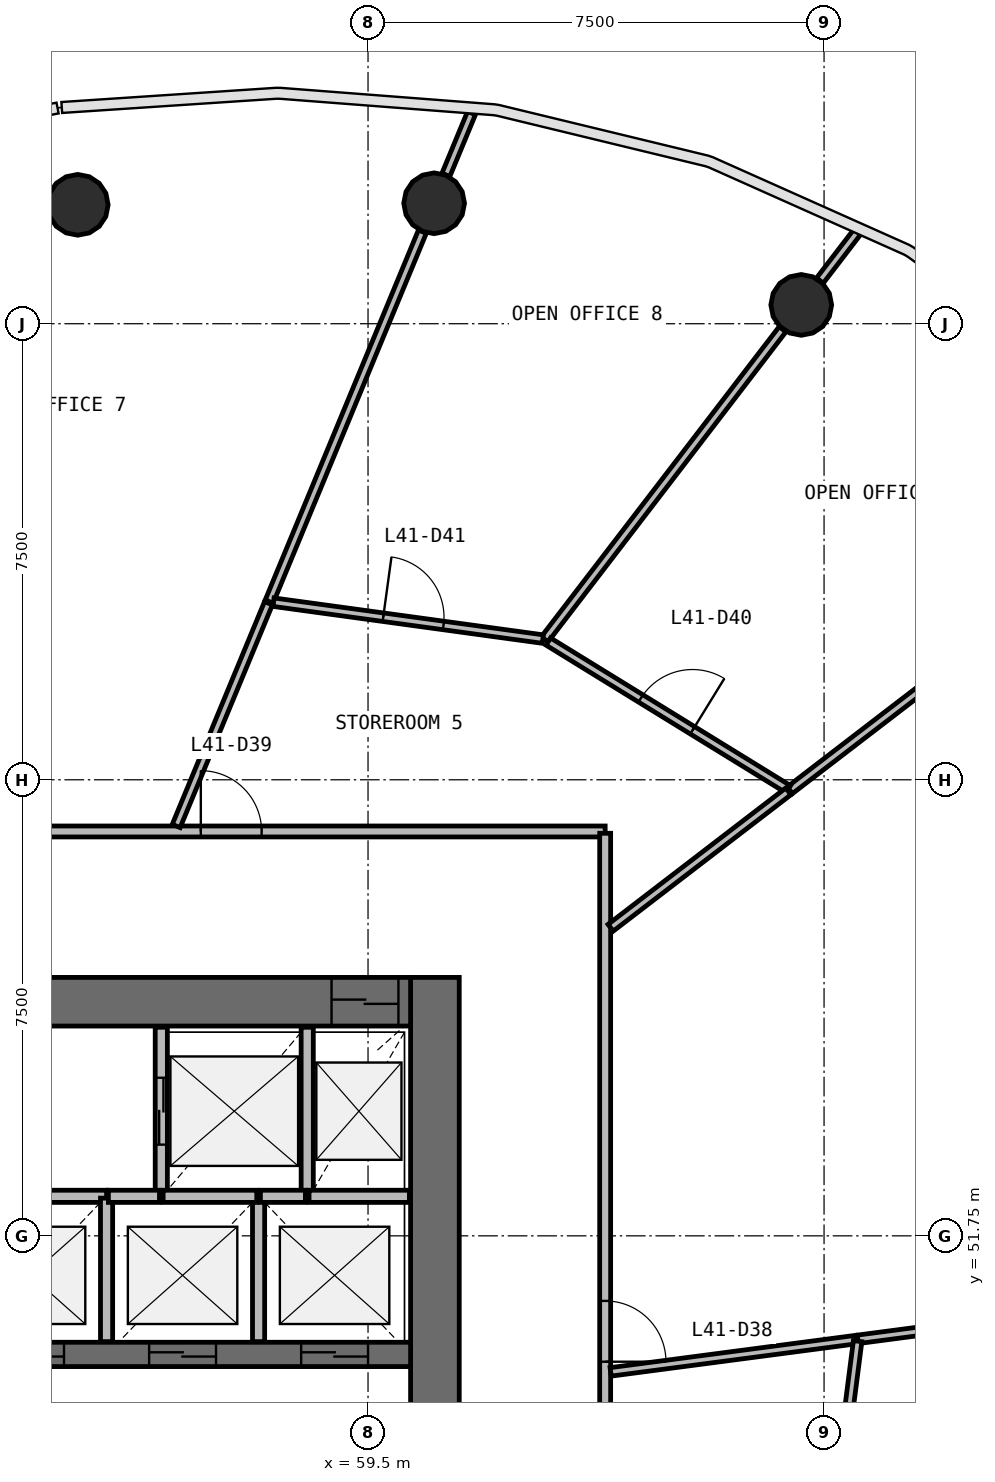
"""IFC4 building model, lengths in metres.
Left out: names, types, materials, properties, quantities, classifications, styles, units other than length and angle.
Written with IfcOpenShell. Run it as: python <this file> out.ifc"""

import sys

from ifc_helpers import new_model, si_unit, direction, frame, frame_2d, origin, origin_2d, place, context, subcontext, project, spatial, rectangle, circle, extrude, source, transform, mapped, element, fill, save


model = new_model("IFC4")
c1 = context("Model", 3, precision=1e-05, world=origin(), true_north=direction((0.0, 1.0)))
c2 = subcontext(c1, "Body", "Model", "MODEL_VIEW")
j1 = project(units=[si_unit("LENGTHUNIT", "METRE"), si_unit("PLANEANGLEUNIT", "RADIAN")], contexts=[c1])
p1 = place(None, origin())
s1 = spatial("IfcSite", under=j1, at=p1, CompositionType="ELEMENT")
p2 = place(p1, origin())
s2 = spatial("IfcBuilding", under=s1, at=p2, CompositionType="ELEMENT")
p3 = place(p2, frame((0.0, 0.0, 172.1)))
s3 = spatial("IfcBuildingStorey", under=s2, at=p3, CompositionType="ELEMENT", Elevation=172.1)
p4 = place(p3, frame((60.6, 40.0, 0.0), z_axis=(0.0, 0.0, 1.0), x_axis=(0.0, 1.0, 0.0)))
e1 = element("IfcWall", 1, at=p4, inside=s3, PredefinedType="SHEAR", context=c2, shape_type="SweptSolid", body=[
    extrude(rectangle(XDim=16.0, YDim=0.8, at=frame_2d((8.0, 0.0))), origin(), (0.0, 0.0, 1.0), 3.9),
])
p5 = place(p4, frame((7.1, 0.0, 0.0)))
e2 = element("IfcOpeningElement", 2, at=p5, cuts=e1, PredefinedType="OPENING", context=c2, shape_type="SweptSolid", body=[
    extrude(rectangle(XDim=1.8, YDim=2.1, at=frame_2d((0.9, 1.05))), frame((0.0, 0.41, 0.0), z_axis=(0.0, -1.0, 0.0), x_axis=(1.0, 0.0, 0.0)), (0.0, 0.0, 1.0), 0.82),
])
p6 = place(p3, frame((60.2, 55.6, 0.0), z_axis=(0.0, 0.0, 1.0), x_axis=(-1.0, 0.0, 0.0)))
e3 = element("IfcWall", 3, at=p6, inside=s3, PredefinedType="SHEAR", context=c2, shape_type="SweptSolid", body=[
    extrude(rectangle(XDim=16.4, YDim=0.8, at=frame_2d((8.2, 0.0))), origin(), (0.0, 0.0, 1.0), 3.9),
])
p7 = place(p6, frame((0.2, 0.0, 0.0)))
e4 = element("IfcOpeningElement", 4, at=p7, cuts=e3, PredefinedType="OPENING", context=c2, shape_type="SweptSolid", body=[
    extrude(rectangle(XDim=1.1, YDim=2.1, at=frame_2d((0.55, 1.05))), frame((0.0, 0.41, 0.0), z_axis=(0.0, -1.0, 0.0), x_axis=(1.0, 0.0, 0.0)), (0.0, 0.0, 1.0), 0.82),
])
p8 = place(p6, frame((10.1, 0.0, 0.0)))
e5 = element("IfcOpeningElement", 5, at=p8, cuts=e3, PredefinedType="OPENING", context=c2, shape_type="SweptSolid", body=[
    extrude(rectangle(XDim=1.2, YDim=2.1, at=frame_2d((0.6, 1.05))), frame((0.0, 0.41, 0.0), z_axis=(0.0, -1.0, 0.0), x_axis=(1.0, 0.0, 0.0)), (0.0, 0.0, 1.0), 0.82),
])
p9 = place(p6, frame((7.05, 0.0, 0.0)))
e6 = element("IfcOpeningElement", 6, at=p9, cuts=e3, PredefinedType="OPENING", context=c2, shape_type="SweptSolid", body=[
    extrude(rectangle(XDim=1.1, YDim=2.1, at=frame_2d((0.55, 1.05))), frame((0.0, 0.41, 0.0), z_axis=(0.0, -1.0, 0.0), x_axis=(1.0, 0.0, 0.0)), (0.0, 0.0, 1.0), 0.82),
])
p10 = place(p3, frame((43.8, 49.8, 0.0), z_axis=(0.0, 0.0, 1.0), x_axis=(1.0, 0.0, 0.0)))
e7 = element("IfcWall", 7, at=p10, inside=s3, PredefinedType="SHEAR", context=c2, shape_type="SweptSolid", body=[
    extrude(rectangle(XDim=16.4, YDim=0.4, at=frame_2d((8.2, 0.0))), origin(), (0.0, 0.0, 1.0), 3.9),
])
p11 = place(p10, frame((9.6, 0.0, 0.0)))
e8 = element("IfcOpeningElement", 8, at=p11, cuts=e7, PredefinedType="OPENING", context=c2, shape_type="SweptSolid", body=[
    extrude(rectangle(XDim=1.1, YDim=2.1, at=frame_2d((0.55, 1.05))), frame((0.0, 0.21, 0.0), z_axis=(0.0, -1.0, 0.0), x_axis=(1.0, 0.0, 0.0)), (0.0, 0.0, 1.0), 0.42),
])
p12 = place(p10, frame((12.1, 0.0, 0.0)))
e9 = element("IfcOpeningElement", 9, at=p12, cuts=e7, PredefinedType="OPENING", context=c2, shape_type="SweptSolid", body=[
    extrude(rectangle(XDim=1.1, YDim=2.1, at=frame_2d((0.55, 1.05))), frame((0.0, 0.21, 0.0), z_axis=(0.0, -1.0, 0.0), x_axis=(1.0, 0.0, 0.0)), (0.0, 0.0, 1.0), 0.42),
])
p13 = place(p10, frame((14.6, 0.0, 0.0)))
e10 = element("IfcOpeningElement", 10, at=p13, cuts=e7, PredefinedType="OPENING", context=c2, shape_type="SweptSolid", body=[
    extrude(rectangle(XDim=1.1, YDim=2.1, at=frame_2d((0.55, 1.05))), frame((0.0, 0.21, 0.0), z_axis=(0.0, -1.0, 0.0), x_axis=(1.0, 0.0, 0.0)), (0.0, 0.0, 1.0), 0.42),
])
p14 = place(p10, frame((2.05, 0.0, 0.0)))
e11 = element("IfcOpeningElement", 11, at=p14, cuts=e7, PredefinedType="OPENING", context=c2, shape_type="SweptSolid", body=[
    extrude(rectangle(XDim=0.9, YDim=2.1, at=frame_2d((0.45, 1.05))), frame((0.0, 0.21, 0.0), z_axis=(0.0, -1.0, 0.0), x_axis=(1.0, 0.0, 0.0)), (0.0, 0.0, 1.0), 0.42),
])
p15 = place(p10, frame((5.05, 0.0, 0.0)))
e12 = element("IfcOpeningElement", 12, at=p15, cuts=e7, PredefinedType="OPENING", context=c2, shape_type="SweptSolid", body=[
    extrude(rectangle(XDim=0.9, YDim=2.1, at=frame_2d((0.45, 1.05))), frame((0.0, 0.21, 0.0), z_axis=(0.0, -1.0, 0.0), x_axis=(1.0, 0.0, 0.0)), (0.0, 0.0, 1.0), 0.42),
])
p16 = place(p10, frame((7.65, 0.0, 0.0)))
e13 = element("IfcOpeningElement", 13, at=p16, cuts=e7, PredefinedType="OPENING", context=c2, shape_type="SweptSolid", body=[
    extrude(rectangle(XDim=0.9, YDim=2.1, at=frame_2d((0.45, 1.05))), frame((0.0, 0.21, 0.0), z_axis=(0.0, -1.0, 0.0), x_axis=(1.0, 0.0, 0.0)), (0.0, 0.0, 1.0), 0.42),
])
m1 = source(origin(), c2, "Body", "SweptSolid", [
    extrude(circle(Radius=0.5, at=origin_2d()), origin(), (0.0, 0.0, 1.0), 3.9),
])
for number, where, z_axis, x_axis in (
    (14, (66.625, 67.06, 0.0), (0.0, 0.0, 1.0), (1.0, 0.0, 0.0)),
    (15, (60.587, 68.731, 0.0), (0.0, 0.0, 1.0), (1.0, 0.0, 0.0)),
    (16, (54.726, 68.705, 0.0), (0.0, 0.0, 1.0), (1.0, 0.0, 0.0)),
):
    element("IfcColumn", number, at=place(p3, frame(where, z_axis=z_axis, x_axis=x_axis)), inside=s3, PredefinedType="COLUMN", context=c2, shape_type="MappedRepresentation", body=[
        mapped(m1, transform((0.0, 0.0, 0.0), scale=1.0)),
    ])
p17 = place(p3, frame((56.1, 55.18, 0.0), z_axis=(0.0, 0.0, 1.0), x_axis=(0.0, -1.0, 0.0)))
e17 = element("IfcWall", 17, at=p17, inside=s3, PredefinedType="SOLIDWALL", context=c2, shape_type="SweptSolid", body=[
    extrude(rectangle(XDim=2.78, YDim=0.2, at=frame_2d((1.39, 0.0))), origin(), (0.0, 0.0, 1.0), 3.58),
])
p18 = place(p17, frame((0.83, 0.0, 0.0)))
e18 = element("IfcOpeningElement", 18, at=p18, cuts=e17, PredefinedType="OPENING", context=c2, shape_type="SweptSolid", body=[
    extrude(rectangle(XDim=1.1, YDim=2.1, at=frame_2d((0.55, 1.05))), frame((0.0, 0.11, 0.0), z_axis=(0.0, -1.0, 0.0), x_axis=(1.0, 0.0, 0.0)), (0.0, 0.0, 1.0), 0.22),
])
p19 = place(p3, frame((58.5, 52.4, 0.0), z_axis=(0.0, 0.0, 1.0), x_axis=(0.0, 1.0, 0.0)))
e19 = element("IfcWall", 19, at=p19, inside=s3, PredefinedType="SOLIDWALL", context=c2, shape_type="SweptSolid", body=[
    extrude(rectangle(XDim=2.78, YDim=0.2, at=frame_2d((1.39, 0.0))), origin(), (0.0, 0.0, 1.0), 3.58),
])
p20 = place(p3, frame((55.2, 52.4, 0.0), z_axis=(0.0, 0.0, 1.0), x_axis=(-1.0, 0.0, 0.0)))
e20 = element("IfcWall", 20, at=p20, inside=s3, PredefinedType="SOLIDWALL", context=c2, shape_type="SweptSolid", body=[
    extrude(rectangle(XDim=2.5, YDim=0.2, at=frame_2d((1.25, 0.0))), origin(), (0.0, 0.0, 1.0), 3.58),
])
p21 = place(p3, frame((55.2, 50.01, 0.0), z_axis=(0.0, 0.0, 1.0), x_axis=(0.0, 1.0, 0.0)))
e21 = element("IfcWall", 21, at=p21, inside=s3, PredefinedType="SOLIDWALL", context=c2, shape_type="SweptSolid", body=[
    extrude(rectangle(XDim=2.36, YDim=0.2, at=frame_2d((1.18, 0.0))), origin(), (0.0, 0.0, 1.0), 3.58),
])
p22 = place(p3, frame((57.7, 50.01, 0.0), z_axis=(0.0, 0.0, 1.0), x_axis=(0.0, 1.0, 0.0)))
e22 = element("IfcWall", 22, at=p22, inside=s3, PredefinedType="SOLIDWALL", context=c2, shape_type="SweptSolid", body=[
    extrude(rectangle(XDim=2.39, YDim=0.2, at=frame_2d((1.195, 0.0))), origin(), (0.0, 0.0, 1.0), 3.58),
])
p23 = place(p3, frame((60.18, 52.4, 0.0), z_axis=(0.0, 0.0, 1.0), x_axis=(-1.0, 0.0, 0.0)))
e23 = element("IfcWall", 23, at=p23, inside=s3, PredefinedType="SOLIDWALL", context=c2, shape_type="SweptSolid", body=[
    extrude(rectangle(XDim=1.65, YDim=0.2, at=frame_2d((0.825, 0.0))), origin(), (0.0, 0.0, 1.0), 3.58),
])
p24 = place(p3, frame((57.67, 52.4, 0.0), z_axis=(0.0, 0.0, 1.0), x_axis=(-1.0, 0.0, 0.0)))
e24 = element("IfcWall", 24, at=p24, inside=s3, PredefinedType="SOLIDWALL", context=c2, shape_type="SweptSolid", body=[
    extrude(rectangle(XDim=1.54, YDim=0.2, at=frame_2d((0.77, 0.0))), origin(), (0.0, 0.0, 1.0), 3.58),
])
p25 = place(p3, frame((56.07, 52.4, 0.0), z_axis=(0.0, 0.0, 1.0), x_axis=(-1.0, 0.0, 0.0)))
e25 = element("IfcWall", 25, at=p25, inside=s3, PredefinedType="SOLIDWALL", context=c2, shape_type="SweptSolid", body=[
    extrude(rectangle(XDim=0.84, YDim=0.2, at=frame_2d((0.42, 0.0))), origin(), (0.0, 0.0, 1.0), 3.58),
])
p26 = place(p3, frame((58.47, 52.4, 0.0), z_axis=(0.0, 0.0, 1.0), x_axis=(-1.0, 0.0, 0.0)))
e26 = element("IfcWall", 26, at=p26, inside=s3, PredefinedType="SOLIDWALL", context=c2, shape_type="SweptSolid", body=[
    extrude(rectangle(XDim=0.74, YDim=0.2, at=frame_2d((0.37, 0.0))), origin(), (0.0, 0.0, 1.0), 3.58),
])
p27 = place(p3, frame((40.6, 58.4, 0.0), z_axis=(0.0, 0.0, 1.0), x_axis=(1.0, 0.0, 0.0)))
e27 = element("IfcWall", 27, at=p27, inside=s3, PredefinedType="PARTITIONING", context=c2, shape_type="SweptSolid", body=[
    extrude(rectangle(XDim=22.8, YDim=0.18, at=frame_2d((11.4, 0.0))), origin(), (0.0, 0.0, 1.0), 2.88),
])
p28 = place(p27, frame((2.05, 0.0, 0.0)))
e28 = element("IfcOpeningElement", 28, at=p28, cuts=e27, PredefinedType="OPENING", context=c2, shape_type="SweptSolid", body=[
    extrude(rectangle(XDim=0.9, YDim=2.1, at=frame_2d((0.45, 1.05))), frame((0.0, 0.1, 0.0), z_axis=(0.0, -1.0, 0.0), x_axis=(1.0, 0.0, 0.0)), (0.0, 0.0, 1.0), 0.2),
])
p29 = place(p27, frame((16.15, 0.0, 0.0)))
e29 = element("IfcOpeningElement", 29, at=p29, cuts=e27, PredefinedType="OPENING", context=c2, shape_type="SweptSolid", body=[
    extrude(rectangle(XDim=1.0, YDim=2.1, at=frame_2d((0.5, 1.05))), frame((0.0, 0.1, 0.0), z_axis=(0.0, -1.0, 0.0), x_axis=(1.0, 0.0, 0.0)), (0.0, 0.0, 1.0), 0.2),
])
p30 = place(p27, frame((10.95, 0.0, 0.0)))
e30 = element("IfcOpeningElement", 30, at=p30, cuts=e27, PredefinedType="OPENING", context=c2, shape_type="SweptSolid", body=[
    extrude(rectangle(XDim=1.0, YDim=2.1, at=frame_2d((0.5, 1.05))), frame((0.0, 0.1, 0.0), z_axis=(0.0, -1.0, 0.0), x_axis=(1.0, 0.0, 0.0)), (0.0, 0.0, 1.0), 0.2),
])
p31 = place(p27, frame((8.75, 0.0, 0.0)))
e31 = element("IfcOpeningElement", 31, at=p31, cuts=e27, PredefinedType="OPENING", context=c2, shape_type="SweptSolid", body=[
    extrude(rectangle(XDim=1.0, YDim=2.1, at=frame_2d((0.5, 1.05))), frame((0.0, 0.1, 0.0), z_axis=(0.0, -1.0, 0.0), x_axis=(1.0, 0.0, 0.0)), (0.0, 0.0, 1.0), 0.2),
])
p32 = place(p3, frame((63.4, 58.37, 0.0), z_axis=(0.0, 0.0, 1.0), x_axis=(0.0, -1.0, 0.0)))
e32 = element("IfcWall", 32, at=p32, inside=s3, PredefinedType="PARTITIONING", context=c2, shape_type="SweptSolid", body=[
    extrude(rectangle(XDim=20.74, YDim=0.18, at=frame_2d((10.37, 0.0))), origin(), (0.0, 0.0, 1.0), 2.88),
])
p33 = place(p32, frame((15.49, 0.0, 0.0)))
e33 = element("IfcOpeningElement", 33, at=p33, cuts=e32, PredefinedType="OPENING", context=c2, shape_type="SweptSolid", body=[
    extrude(rectangle(XDim=1.0, YDim=2.1, at=frame_2d((0.5, 1.05))), frame((0.0, 0.1, 0.0), z_axis=(0.0, -1.0, 0.0), x_axis=(1.0, 0.0, 0.0)), (0.0, 0.0, 1.0), 0.2),
])
p34 = place(p32, frame((9.89, 0.0, 0.0)))
e34 = element("IfcOpeningElement", 34, at=p34, cuts=e32, PredefinedType="OPENING", context=c2, shape_type="SweptSolid", body=[
    extrude(rectangle(XDim=1.0, YDim=2.1, at=frame_2d((0.5, 1.05))), frame((0.0, 0.1, 0.0), z_axis=(0.0, -1.0, 0.0), x_axis=(1.0, 0.0, 0.0)), (0.0, 0.0, 1.0), 0.2),
])
p35 = place(p32, frame((7.69, 0.0, 0.0)))
e35 = element("IfcOpeningElement", 35, at=p35, cuts=e32, PredefinedType="OPENING", context=c2, shape_type="SweptSolid", body=[
    extrude(rectangle(XDim=1.0, YDim=2.1, at=frame_2d((0.5, 1.05))), frame((0.0, 0.1, 0.0), z_axis=(0.0, -1.0, 0.0), x_axis=(1.0, 0.0, 0.0)), (0.0, 0.0, 1.0), 0.2),
])
p36 = place(p3, frame((67.556, 50.048, 0.0), z_axis=(0.0, 0.0, 1.0), x_axis=(0.991449473543, 0.130491154531, 0.0)))
e36 = element("IfcWall", 36, at=p36, inside=s3, PredefinedType="PARTITIONING", context=c2, shape_type="SweptSolid", body=[
    extrude(rectangle(XDim=7.066, YDim=0.14, at=frame_2d((3.533, 0.0))), origin(), (0.0, 0.0, 1.0), 2.88),
])
p37 = place(p3, frame((57.874, 62.18, 0.0), z_axis=(0.0, 0.0, 1.0), x_axis=(0.382677040964, 0.92388217989, 0.0)))
e37 = element("IfcWall", 37, at=p37, inside=s3, PredefinedType="PARTITIONING", context=c2, shape_type="SweptSolid", body=[
    extrude(rectangle(XDim=6.585, YDim=0.14, at=frame_2d((3.292, 0.0))), origin(), (0.0, 0.0, 1.0), 2.88),
])
p38 = place(p3, frame((62.405, 61.56, 0.0), z_axis=(0.0, 0.0, 1.0), x_axis=(0.608781538985, 0.793337908958, 0.0)))
e38 = element("IfcWall", 38, at=p38, inside=s3, PredefinedType="PARTITIONING", context=c2, shape_type="SweptSolid", body=[
    extrude(rectangle(XDim=6.428, YDim=0.14, at=frame_2d((3.214, 0.0))), origin(), (0.0, 0.0, 1.0), 2.88),
])
p39 = place(p3, frame((66.437, 59.078, 0.0), z_axis=(0.0, 0.0, 1.0), x_axis=(0.793368198418, 0.608742065032, 0.0)))
e39 = element("IfcWall", 39, at=p39, inside=s3, PredefinedType="PARTITIONING", context=c2, shape_type="SweptSolid", body=[
    extrude(rectangle(XDim=6.288, YDim=0.14, at=frame_2d((3.144, 0.0))), origin(), (0.0, 0.0, 1.0), 2.88),
])
p40 = place(p3, frame((62.465, 61.523, 0.0), z_axis=(0.0, 0.0, 1.0), x_axis=(0.851618521929, -0.524162086675, 0.0)))
e40 = element("IfcWall", 40, at=p40, inside=s3, PredefinedType="PARTITIONING", context=c2, shape_type="SweptSolid", body=[
    extrude(rectangle(XDim=4.635, YDim=0.14, at=frame_2d((2.317, 0.0))), origin(), (0.0, 0.0, 1.0), 2.88),
])
p41 = place(p40, frame((1.785, 0.0, 0.0)))
e41 = element("IfcOpeningElement", 41, at=p41, cuts=e40, PredefinedType="OPENING", context=c2, shape_type="SweptSolid", body=[
    extrude(rectangle(XDim=1.0, YDim=2.1, at=frame_2d((0.5, 1.05))), frame((0.0, 0.08, 0.0), z_axis=(0.0, -1.0, 0.0), x_axis=(1.0, 0.0, 0.0)), (0.0, 0.0, 1.0), 0.16),
])
p42 = place(p3, frame((57.946, 62.171, 0.0), z_axis=(0.0, 0.0, 1.0), x_axis=(0.990750915394, -0.135693123057, 0.0)))
e42 = element("IfcWall", 42, at=p42, inside=s3, PredefinedType="PARTITIONING", context=c2, shape_type="SweptSolid", body=[
    extrude(rectangle(XDim=4.471, YDim=0.14, at=frame_2d((2.235, 0.0))), origin(), (0.0, 0.0, 1.0), 2.88),
])
p43 = place(p42, frame((1.821, 0.0, 0.0)))
e43 = element("IfcOpeningElement", 43, at=p43, cuts=e42, PredefinedType="OPENING", context=c2, shape_type="SweptSolid", body=[
    extrude(rectangle(XDim=1.0, YDim=2.1, at=frame_2d((0.5, 1.05))), frame((0.0, 0.08, 0.0), z_axis=(0.0, -1.0, 0.0), x_axis=(1.0, 0.0, 0.0)), (0.0, 0.0, 1.0), 0.16),
])
p44 = place(p3, frame((63.49, 49.513, 0.0), z_axis=(0.0, 0.0, 1.0), x_axis=(0.99144081821, 0.130556899422, 0.0)))
e44 = element("IfcWall", 44, at=p44, inside=s3, PredefinedType="PARTITIONING", context=c2, shape_type="SweptSolid", body=[
    extrude(rectangle(XDim=4.071, YDim=0.14, at=frame_2d((2.036, 0.0))), origin(), (0.0, 0.0, 1.0), 2.88),
])
p45 = place(p3, frame((56.345, 58.49, 0.0), z_axis=(0.0, 0.0, 1.0), x_axis=(0.382659985547, 0.923889244153, 0.0)))
e45 = element("IfcWall", 45, at=p45, inside=s3, PredefinedType="PARTITIONING", context=c2, shape_type="SweptSolid", body=[
    extrude(rectangle(XDim=3.965, YDim=0.14, at=frame_2d((1.982, 0.0))), origin(), (0.0, 0.0, 1.0), 2.88),
])
p46 = place(p3, frame((67.552, 50.018, 0.0), z_axis=(0.0, 0.0, 1.0), x_axis=(-0.127345948967, -0.991858361502, 0.0)))
e46 = element("IfcWall", 46, at=p46, inside=s3, PredefinedType="PARTITIONING", context=c2, shape_type="SweptSolid", body=[
    extrude(rectangle(XDim=4.001, YDim=0.14, at=frame_2d((2.0, 0.0))), origin(), (0.0, 0.0, 1.0), 2.88),
])
p47 = place(p46, frame((1.551, 0.0, 0.0)))
e47 = element("IfcOpeningElement", 47, at=p47, cuts=e46, PredefinedType="OPENING", context=c2, shape_type="SweptSolid", body=[
    extrude(rectangle(XDim=1.0, YDim=2.1, at=frame_2d((0.5, 1.05))), frame((0.0, 0.08, 0.0), z_axis=(0.0, -1.0, 0.0), x_axis=(1.0, 0.0, 0.0)), (0.0, 0.0, 1.0), 0.16),
])
p48 = place(p3, frame((63.49, 56.817, 0.0), z_axis=(0.0, 0.0, 1.0), x_axis=(0.793352487639, 0.608762540206, 0.0)))
e48 = element("IfcWall", 48, at=p48, inside=s3, PredefinedType="PARTITIONING", context=c2, shape_type="SweptSolid", body=[
    extrude(rectangle(XDim=3.685, YDim=0.14, at=frame_2d((1.842, 0.0))), origin(), (0.0, 0.0, 1.0), 2.88),
])
p49 = place(p3, frame((60.78, 69.198, 0.0), z_axis=(0.0, 0.0, 1.0), x_axis=(0.382724096228, 0.923862687939, 0.0)))
e49 = element("IfcWall", 49, at=p49, inside=s3, PredefinedType="PARTITIONING", context=c2, shape_type="SweptSolid", body=[
    extrude(rectangle(XDim=1.1, YDim=0.14, at=frame_2d((0.55, 0.0))), origin(), (0.0, 0.0, 1.0), 2.88),
])
p50 = place(p3, frame((66.932, 67.46, 0.0), z_axis=(0.0, 0.0, 1.0), x_axis=(0.608710939512, 0.793392079692, 0.0)))
e50 = element("IfcWall", 50, at=p50, inside=s3, PredefinedType="PARTITIONING", context=c2, shape_type="SweptSolid", body=[
    extrude(rectangle(XDim=1.027, YDim=0.14, at=frame_2d((0.514, 0.0))), origin(), (0.0, 0.0, 1.0), 2.88),
])
m2 = source(origin(), c2, "Body", "SweptSolid", [
    extrude(rectangle(XDim=1.1, YDim=2.1, at=frame_2d((0.55, 1.05))), frame((0.0, 0.025, 0.0), z_axis=(0.0, -1.0, 0.0), x_axis=(1.0, 0.0, 0.0)), (0.0, 0.0, 1.0), 0.05),
])
p51 = place(p11, origin())
e51 = element("IfcDoor", 51, at=p51, inside=s3, OperationType="DOUBLE_DOOR_SLIDING", PredefinedType="USERDEFINED", context=c2, shape_type="MappedRepresentation", body=[
    mapped(m2, transform((0.0, 0.0, 0.0), scale=1.0)),
])
fill(e8, e51)
p52 = place(p12, origin())
e52 = element("IfcDoor", 52, at=p52, inside=s3, OperationType="DOUBLE_DOOR_SLIDING", PredefinedType="USERDEFINED", context=c2, shape_type="MappedRepresentation", body=[
    mapped(m2, transform((0.0, 0.0, 0.0), scale=1.0)),
])
fill(e9, e52)
p53 = place(p13, origin())
e53 = element("IfcDoor", 53, at=p53, inside=s3, OperationType="DOUBLE_DOOR_SLIDING", PredefinedType="USERDEFINED", context=c2, shape_type="MappedRepresentation", body=[
    mapped(m2, transform((0.0, 0.0, 0.0), scale=1.0)),
])
fill(e10, e53)
p54 = place(p18, origin())
e54 = element("IfcDoor", 54, at=p54, inside=s3, OperationType="DOUBLE_DOOR_SLIDING", PredefinedType="USERDEFINED", context=c2, shape_type="MappedRepresentation", body=[
    mapped(m2, transform((0.0, 0.0, 0.0), scale=1.0)),
])
fill(e18, e54)
p55 = place(p7, origin())
e55 = element("IfcDoor", 55, at=p55, inside=s3, OperationType="DOUBLE_DOOR_SLIDING", PredefinedType="USERDEFINED", context=c2, shape_type="MappedRepresentation", body=[
    mapped(m2, transform((0.0, 0.0, 0.0), scale=1.0)),
])
fill(e4, e55)
m3 = source(origin(), c2, "Body", "SweptSolid", [
    extrude(rectangle(XDim=1.0, YDim=2.1, at=frame_2d((0.5, 1.05))), frame((0.0, 0.025, 0.0), z_axis=(0.0, -1.0, 0.0), x_axis=(1.0, 0.0, 0.0)), (0.0, 0.0, 1.0), 0.05),
])
p56 = place(p35, origin())
e56 = element("IfcDoor", 56, at=p56, inside=s3, OperationType="SINGLE_SWING_RIGHT", PredefinedType="DOOR", context=c2, shape_type="MappedRepresentation", body=[
    mapped(m3, transform((0.0, 0.0, 0.0), scale=1.0)),
])
fill(e35, e56)
p57 = place(p29, origin())
e57 = element("IfcDoor", 57, at=p57, inside=s3, OperationType="SINGLE_SWING_LEFT", PredefinedType="DOOR", context=c2, shape_type="MappedRepresentation", body=[
    mapped(m3, transform((0.0, 0.0, 0.0), scale=1.0)),
])
fill(e29, e57)
p58 = place(p41, origin())
e58 = element("IfcDoor", 58, at=p58, inside=s3, OperationType="SINGLE_SWING_RIGHT", PredefinedType="DOOR", context=c2, shape_type="MappedRepresentation", body=[
    mapped(m3, transform((0.0, 0.0, 0.0), scale=1.0)),
])
fill(e41, e58)
p59 = place(p43, origin())
e59 = element("IfcDoor", 59, at=p59, inside=s3, OperationType="SINGLE_SWING_LEFT", PredefinedType="DOOR", context=c2, shape_type="MappedRepresentation", body=[
    mapped(m3, transform((0.0, 0.0, 0.0), scale=1.0)),
])
fill(e43, e59)
save(model, sys.argv[1])
